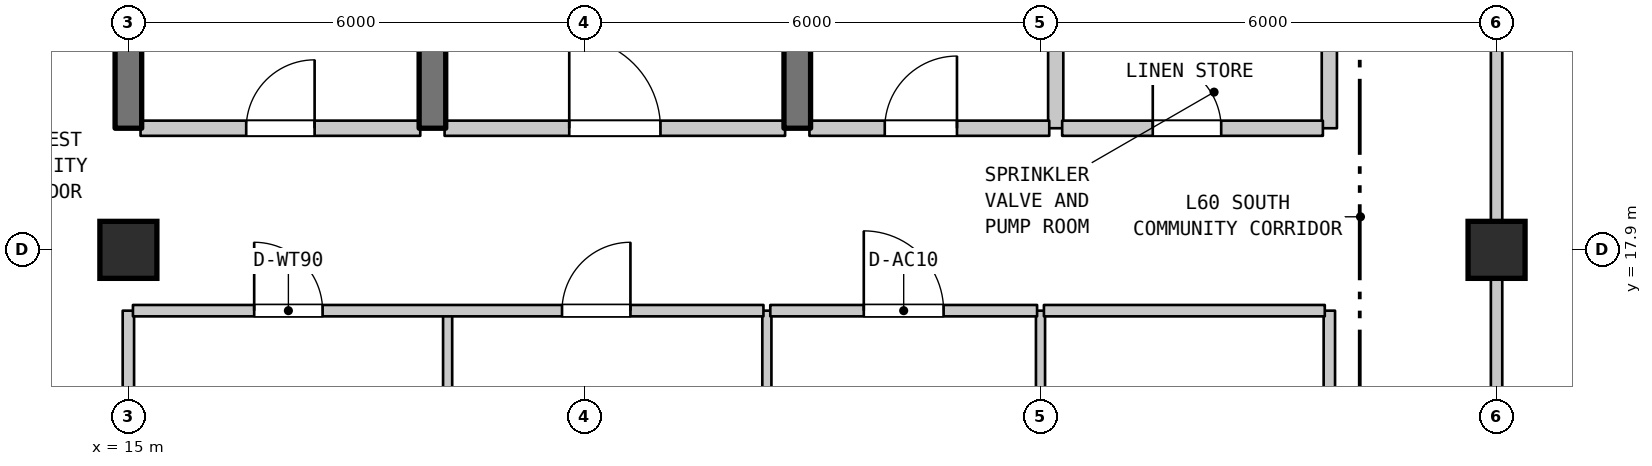
"""IFC4 building model, lengths in metres.
Left out: names, types, materials, properties, quantities, classifications, styles, units other than length and angle.
Written with IfcOpenShell. Run it as: python <this file> out.ifc"""

import sys

from ifc_helpers import new_model, si_unit, direction, frame, frame_2d, origin, origin_2d, place, context, subcontext, project, spatial, rectangle, extrude, element, fill, save


model = new_model("IFC4")
c1 = context("Model", 3, precision=1e-05, world=origin(), true_north=direction((0.0, 1.0)))
c2 = subcontext(c1, "Body", "Model", "MODEL_VIEW")
j1 = project(units=[si_unit("LENGTHUNIT", "METRE"), si_unit("PLANEANGLEUNIT", "RADIAN")], contexts=[c1])
p1 = place(None, origin())
s1 = spatial("IfcSite", under=j1, at=p1, CompositionType="ELEMENT")
p2 = place(p1, origin())
s2 = spatial("IfcBuilding", under=s1, at=p2, CompositionType="ELEMENT")
p3 = place(p2, frame((0.0, 0.0, 242.8)))
s3 = spatial("IfcBuildingStorey", under=s2, at=p3, CompositionType="ELEMENT", Elevation=242.8)
for number, where, z_axis, x_axis in (
    (1, (15.0, 17.9, 0.0), (0.0, 0.0, 1.0), (1.0, 0.0, 0.0)),
    (2, (33.0, 17.9, 0.0), (0.0, 0.0, 1.0), (1.0, 0.0, 0.0)),
):
    element("IfcColumn", number, at=place(p3, frame(where, z_axis=z_axis, x_axis=x_axis)), inside=s3, PredefinedType="COLUMN", context=c2, shape_type="SweptSolid", body=[
        extrude(rectangle(XDim=0.75, YDim=0.75, at=origin_2d()), origin(), (0.0, 0.0, 1.0), 4.5),
    ])
p4 = place(p3, frame((15.0, 13.0, 0.0), z_axis=(0.0, 0.0, 1.0), x_axis=(0.0, 1.0, 0.0)))
e3 = element("IfcWall", 3, at=p4, inside=s3, PredefinedType="STANDARD", context=c2, shape_type="SweptSolid", body=[
    extrude(rectangle(XDim=4.1, YDim=0.15, at=frame_2d((2.05, 0.0))), origin(), (0.0, 0.0, 1.0), 3.9),
])
for number, where, z_axis, x_axis in (
    (4, (15.0, 19.5, 0.0), (0.0, 0.0, 1.0), (0.0, 1.0, 0.0)),
    (5, (19.0, 19.5, 0.0), (0.0, 0.0, 1.0), (0.0, 1.0, 0.0)),
):
    element("IfcWall", number, at=place(p3, frame(where, z_axis=z_axis, x_axis=x_axis)), inside=s3, PredefinedType="SHEAR", context=c2, shape_type="SweptSolid", body=[
        extrude(rectangle(XDim=3.2, YDim=0.35, at=frame_2d((1.6, 0.0))), origin(), (0.0, 0.0, 1.0), 4.19),
    ])
for number, where, z_axis, x_axis in (
    (6, (19.2, 13.0, 0.0), (0.0, 0.0, 1.0), (0.0, 1.0, 0.0)),
    (7, (23.4, 13.0, 0.0), (0.0, 0.0, 1.0), (0.0, 1.0, 0.0)),
):
    element("IfcWall", number, at=place(p3, frame(where, z_axis=z_axis, x_axis=x_axis)), inside=s3, PredefinedType="PARTITIONING", context=c2, shape_type="SweptSolid", body=[
        extrude(rectangle(XDim=4.1, YDim=0.12, at=frame_2d((2.05, 0.0))), origin(), (0.0, 0.0, 1.0), 4.19),
    ])
p5 = place(p3, frame((23.8, 19.5, 0.0), z_axis=(0.0, 0.0, 1.0), x_axis=(0.0, 1.0, 0.0)))
e8 = element("IfcWall", 8, at=p5, inside=s3, PredefinedType="SHEAR", context=c2, shape_type="SweptSolid", body=[
    extrude(rectangle(XDim=3.2, YDim=0.35, at=frame_2d((1.6, 0.0))), origin(), (0.0, 0.0, 1.0), 4.19),
])
p6 = place(p3, frame((27.0, 14.5, 0.0), z_axis=(0.0, 0.0, 1.0), x_axis=(0.0, 1.0, 0.0)))
e9 = element("IfcWall", 9, at=p6, inside=s3, PredefinedType="PARTITIONING", context=c2, shape_type="SweptSolid", body=[
    extrude(rectangle(XDim=2.6, YDim=0.12, at=frame_2d((1.3, 0.0))), origin(), (0.0, 0.0, 1.0), 4.19),
])
p7 = place(p3, frame((27.2, 19.5, 0.0), z_axis=(0.0, 0.0, 1.0), x_axis=(0.0, 1.0, 0.0)))
e10 = element("IfcWall", 10, at=p7, inside=s3, PredefinedType="STANDARD", context=c2, shape_type="SweptSolid", body=[
    extrude(rectangle(XDim=1.6, YDim=0.2, at=frame_2d((0.8, 0.0))), origin(), (0.0, 0.0, 1.0), 4.19),
])
p8 = place(p3, frame((30.8, 14.5, 0.0), z_axis=(0.0, 0.0, 1.0), x_axis=(0.0, 1.0, 0.0)))
e11 = element("IfcWall", 11, at=p8, inside=s3, PredefinedType="STANDARD", context=c2, shape_type="SweptSolid", body=[
    extrude(rectangle(XDim=2.6, YDim=0.15, at=frame_2d((1.3, 0.0))), origin(), (0.0, 0.0, 1.0), 4.19),
])
p9 = place(p3, frame((30.8, 19.5, 0.0), z_axis=(0.0, 0.0, 1.0), x_axis=(0.0, 1.0, 0.0)))
e12 = element("IfcWall", 12, at=p9, inside=s3, PredefinedType="STANDARD", context=c2, shape_type="SweptSolid", body=[
    extrude(rectangle(XDim=1.6, YDim=0.2, at=frame_2d((0.8, 0.0))), origin(), (0.0, 0.0, 1.0), 4.19),
])
p10 = place(p3, frame((33.0, 6.71, 0.0), z_axis=(0.0, 0.0, 1.0), x_axis=(0.0, 1.0, 0.0)))
e13 = element("IfcWall", 13, at=p10, inside=s3, PredefinedType="STANDARD", context=c2, shape_type="SweptSolid", body=[
    extrude(rectangle(XDim=19.19, YDim=0.15, at=frame_2d((9.595, 0.0))), origin(), (0.0, 0.0, 1.0), 3.9),
])
p11 = place(p3, frame((15.06, 17.1, 0.0), z_axis=(0.0, 0.0, 1.0), x_axis=(1.0, 0.0, 0.0)))
e14 = element("IfcWall", 14, at=p11, inside=s3, PredefinedType="STANDARD", context=c2, shape_type="SweptSolid", body=[
    extrude(rectangle(XDim=8.295, YDim=0.15, at=frame_2d((4.147, 0.0))), origin(), (0.0, 0.0, 1.0), 4.19),
])
p12 = place(p11, frame((1.595, 0.0, 0.0)))
e15 = element("IfcOpeningElement", 15, at=p12, cuts=e14, PredefinedType="OPENING", context=c2, shape_type="SweptSolid", body=[
    extrude(rectangle(XDim=0.9, YDim=2.1, at=frame_2d((0.45, 1.05))), frame((0.0, 0.085, 0.0), z_axis=(0.0, -1.0, 0.0), x_axis=(1.0, 0.0, 0.0)), (0.0, 0.0, 1.0), 0.17),
])
p13 = place(p11, frame((5.645, 0.0, 0.0)))
e16 = element("IfcOpeningElement", 16, at=p13, cuts=e14, PredefinedType="OPENING", context=c2, shape_type="SweptSolid", body=[
    extrude(rectangle(XDim=0.9, YDim=2.1, at=frame_2d((0.45, 1.05))), frame((0.0, 0.085, 0.0), z_axis=(0.0, -1.0, 0.0), x_axis=(1.0, 0.0, 0.0)), (0.0, 0.0, 1.0), 0.17),
])
p14 = place(p3, frame((23.445, 17.1, 0.0), z_axis=(0.0, 0.0, 1.0), x_axis=(1.0, 0.0, 0.0)))
e17 = element("IfcWall", 17, at=p14, inside=s3, PredefinedType="STANDARD", context=c2, shape_type="SweptSolid", body=[
    extrude(rectangle(XDim=3.51, YDim=0.15, at=frame_2d((1.755, 0.0))), origin(), (0.0, 0.0, 1.0), 4.19),
])
p15 = place(p14, frame((1.23, 0.0, 0.0)))
e18 = element("IfcOpeningElement", 18, at=p15, cuts=e17, PredefinedType="OPENING", context=c2, shape_type="SweptSolid", body=[
    extrude(rectangle(XDim=1.05, YDim=2.15, at=frame_2d((0.525, 1.075))), frame((0.0, 0.085, 0.0), z_axis=(0.0, -1.0, 0.0), x_axis=(1.0, 0.0, 0.0)), (0.0, 0.0, 1.0), 0.17),
])
p16 = place(p3, frame((27.045, 17.1, 0.0), z_axis=(0.0, 0.0, 1.0), x_axis=(1.0, 0.0, 0.0)))
e19 = element("IfcWall", 19, at=p16, inside=s3, PredefinedType="STANDARD", context=c2, shape_type="SweptSolid", body=[
    extrude(rectangle(XDim=3.695, YDim=0.15, at=frame_2d((1.848, 0.0))), origin(), (0.0, 0.0, 1.0), 4.19),
])
p17 = place(p3, frame((15.16, 19.5, 0.0), z_axis=(0.0, 0.0, 1.0), x_axis=(1.0, 0.0, 0.0)))
e20 = element("IfcWall", 20, at=p17, inside=s3, PredefinedType="STANDARD", context=c2, shape_type="SweptSolid", body=[
    extrude(rectangle(XDim=3.68, YDim=0.2, at=frame_2d((1.84, 0.0))), origin(), (0.0, 0.0, 1.0), 4.19),
])
p18 = place(p17, frame((1.39, 0.0, 0.0)))
e21 = element("IfcOpeningElement", 21, at=p18, cuts=e20, PredefinedType="OPENING", context=c2, shape_type="SweptSolid", body=[
    extrude(rectangle(XDim=0.9, YDim=2.15, at=frame_2d((0.45, 1.075))), frame((0.0, 0.11, 0.0), z_axis=(0.0, -1.0, 0.0), x_axis=(1.0, 0.0, 0.0)), (0.0, 0.0, 1.0), 0.22),
])
p19 = place(p3, frame((19.16, 19.5, 0.0), z_axis=(0.0, 0.0, 1.0), x_axis=(1.0, 0.0, 0.0)))
e22 = element("IfcWall", 22, at=p19, inside=s3, PredefinedType="STANDARD", context=c2, shape_type="SweptSolid", body=[
    extrude(rectangle(XDim=4.48, YDim=0.2, at=frame_2d((2.24, 0.0))), origin(), (0.0, 0.0, 1.0), 4.19),
])
p20 = place(p19, frame((1.64, 0.0, 0.0)))
e23 = element("IfcOpeningElement", 23, at=p20, cuts=e22, PredefinedType="OPENING", context=c2, shape_type="SweptSolid", body=[
    extrude(rectangle(XDim=1.2, YDim=2.2, at=frame_2d((0.6, 1.1))), frame((0.0, 0.11, 0.0), z_axis=(0.0, -1.0, 0.0), x_axis=(1.0, 0.0, 0.0)), (0.0, 0.0, 1.0), 0.22),
])
p21 = place(p3, frame((23.96, 19.5, 0.0), z_axis=(0.0, 0.0, 1.0), x_axis=(1.0, 0.0, 0.0)))
e24 = element("IfcWall", 24, at=p21, inside=s3, PredefinedType="STANDARD", context=c2, shape_type="SweptSolid", body=[
    extrude(rectangle(XDim=3.155, YDim=0.2, at=frame_2d((1.578, 0.0))), origin(), (0.0, 0.0, 1.0), 4.19),
])
p22 = place(p21, frame((0.991, 0.0, 0.0)))
e25 = element("IfcOpeningElement", 25, at=p22, cuts=e24, PredefinedType="OPENING", context=c2, shape_type="SweptSolid", body=[
    extrude(rectangle(XDim=0.95, YDim=2.15, at=frame_2d((0.475, 1.075))), frame((0.0, 0.11, 0.0), z_axis=(0.0, -1.0, 0.0), x_axis=(1.0, 0.0, 0.0)), (0.0, 0.0, 1.0), 0.22),
])
p23 = place(p3, frame((27.285, 19.5, 0.0), z_axis=(0.0, 0.0, 1.0), x_axis=(1.0, 0.0, 0.0)))
e26 = element("IfcWall", 26, at=p23, inside=s3, PredefinedType="STANDARD", context=c2, shape_type="SweptSolid", body=[
    extrude(rectangle(XDim=3.43, YDim=0.2, at=frame_2d((1.715, 0.0))), origin(), (0.0, 0.0, 1.0), 4.19),
])
p24 = place(p23, frame((1.192, 0.0, 0.0)))
e27 = element("IfcOpeningElement", 27, at=p24, cuts=e26, PredefinedType="OPENING", context=c2, shape_type="SweptSolid", body=[
    extrude(rectangle(XDim=0.9, YDim=2.15, at=frame_2d((0.45, 1.075))), frame((0.0, 0.11, 0.0), z_axis=(0.0, -1.0, 0.0), x_axis=(1.0, 0.0, 0.0)), (0.0, 0.0, 1.0), 0.22),
])
p25 = place(p12, origin())
e28 = element("IfcDoor", 28, at=p25, inside=s3, OperationType="SINGLE_SWING_LEFT", PredefinedType="DOOR", context=c2, shape_type="SweptSolid", body=[
    extrude(rectangle(XDim=0.9, YDim=2.1, at=frame_2d((0.45, 1.05))), frame((0.0, 0.025, 0.0), z_axis=(0.0, -1.0, 0.0), x_axis=(1.0, 0.0, 0.0)), (0.0, 0.0, 1.0), 0.05),
])
fill(e15, e28)
p26 = place(p13, origin())
e29 = element("IfcDoor", 29, at=p26, inside=s3, OperationType="SINGLE_SWING_RIGHT", PredefinedType="DOOR", context=c2, shape_type="SweptSolid", body=[
    extrude(rectangle(XDim=0.9, YDim=2.1, at=frame_2d((0.45, 1.05))), frame((0.0, 0.025, 0.0), z_axis=(0.0, -1.0, 0.0), x_axis=(1.0, 0.0, 0.0)), (0.0, 0.0, 1.0), 0.05),
])
fill(e16, e29)
p27 = place(p15, origin())
e30 = element("IfcDoor", 30, at=p27, inside=s3, OperationType="SINGLE_SWING_LEFT", PredefinedType="DOOR", context=c2, shape_type="SweptSolid", body=[
    extrude(rectangle(XDim=1.05, YDim=2.15, at=frame_2d((0.525, 1.075))), frame((0.0, 0.025, 0.0), z_axis=(0.0, -1.0, 0.0), x_axis=(1.0, 0.0, 0.0)), (0.0, 0.0, 1.0), 0.05),
])
fill(e18, e30)
p28 = place(p18, origin())
e31 = element("IfcDoor", 31, at=p28, inside=s3, OperationType="SINGLE_SWING_RIGHT", PredefinedType="DOOR", context=c2, shape_type="SweptSolid", body=[
    extrude(rectangle(XDim=0.9, YDim=2.15, at=frame_2d((0.45, 1.075))), frame((0.0, 0.025, 0.0), z_axis=(0.0, -1.0, 0.0), x_axis=(1.0, 0.0, 0.0)), (0.0, 0.0, 1.0), 0.05),
])
fill(e21, e31)
p29 = place(p20, origin())
e32 = element("IfcDoor", 32, at=p29, inside=s3, OperationType="SINGLE_SWING_LEFT", PredefinedType="DOOR", context=c2, shape_type="SweptSolid", body=[
    extrude(rectangle(XDim=1.2, YDim=2.2, at=frame_2d((0.6, 1.1))), frame((0.0, 0.025, 0.0), z_axis=(0.0, -1.0, 0.0), x_axis=(1.0, 0.0, 0.0)), (0.0, 0.0, 1.0), 0.05),
])
fill(e23, e32)
p30 = place(p22, origin())
e33 = element("IfcDoor", 33, at=p30, inside=s3, OperationType="SINGLE_SWING_RIGHT", PredefinedType="DOOR", context=c2, shape_type="SweptSolid", body=[
    extrude(rectangle(XDim=0.95, YDim=2.15, at=frame_2d((0.475, 1.075))), frame((0.0, 0.025, 0.0), z_axis=(0.0, -1.0, 0.0), x_axis=(1.0, 0.0, 0.0)), (0.0, 0.0, 1.0), 0.05),
])
fill(e25, e33)
p31 = place(p24, origin())
e34 = element("IfcDoor", 34, at=p31, inside=s3, OperationType="SINGLE_SWING_LEFT", PredefinedType="DOOR", context=c2, shape_type="SweptSolid", body=[
    extrude(rectangle(XDim=0.9, YDim=2.15, at=frame_2d((0.45, 1.075))), frame((0.0, 0.025, 0.0), z_axis=(0.0, -1.0, 0.0), x_axis=(1.0, 0.0, 0.0)), (0.0, 0.0, 1.0), 0.05),
])
fill(e27, e34)
save(model, sys.argv[1])
